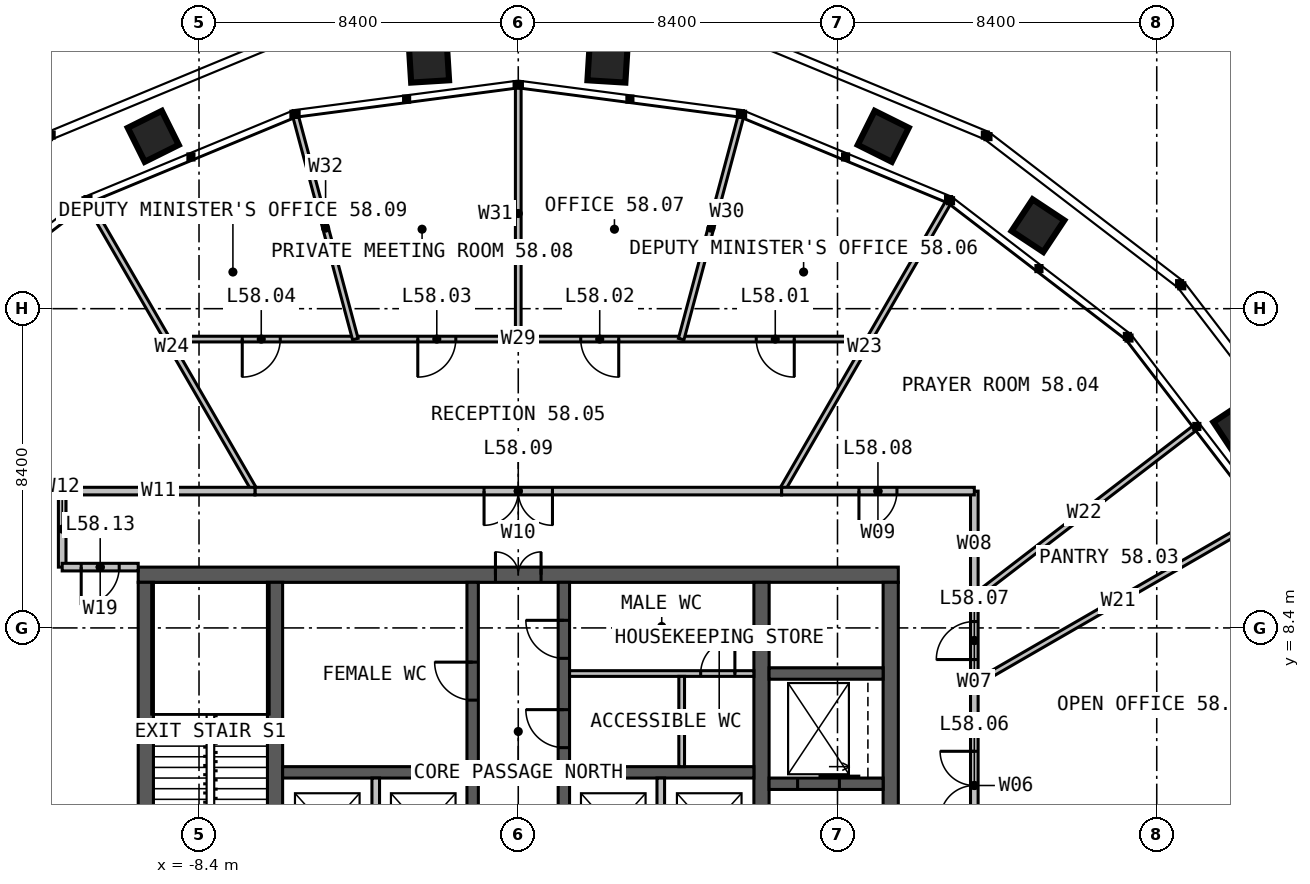
"""IFC4 building model, lengths in metres.
Left out: names, types, materials, properties, quantities, classifications, styles, units other than length and angle.
Written with IfcOpenShell. Run it as: python <this file> out.ifc"""

import sys

from ifc_helpers import new_model, si_unit, direction, frame, frame_2d, origin, place, context, subcontext, project, spatial, rectangle, extrude, element, fill, save


model = new_model("IFC4")
c1 = context("Model", 3, precision=1e-05, world=origin(), true_north=direction((0.0, 1.0)))
c2 = subcontext(c1, "Body", "Model", "MODEL_VIEW")
j1 = project(units=[si_unit("LENGTHUNIT", "METRE"), si_unit("PLANEANGLEUNIT", "RADIAN")], contexts=[c1])
p1 = place(None, origin())
s1 = spatial("IfcSite", under=j1, at=p1, CompositionType="ELEMENT")
p2 = place(p1, origin())
s2 = spatial("IfcBuilding", under=s1, at=p2, CompositionType="ELEMENT")
p3 = place(p2, frame((0.0, 0.0, 240.0)))
s3 = spatial("IfcBuildingStorey", under=s2, at=p3, CompositionType="ELEMENT", Elevation=240.0)
p4 = place(p3, frame((-10.0, 9.8, 0.0), z_axis=(0.0, 0.0, 1.0), x_axis=(1.0, 0.0, 0.0)))
e1 = element("IfcWall", 1, at=p4, inside=s3, PredefinedType="SOLIDWALL", context=c2, shape_type="SweptSolid", body=[
    extrude(rectangle(XDim=20.0, YDim=0.4, at=frame_2d((10.0, 0.0))), origin(), (0.0, 0.0, 1.0), 4.0),
])
p5 = place(p4, frame((9.4, 0.0, 0.0)))
e2 = element("IfcOpeningElement", 2, at=p5, cuts=e1, PredefinedType="OPENING", context=c2, shape_type="SweptSolid", body=[
    extrude(rectangle(XDim=1.2, YDim=2.2, at=frame_2d((0.6, 1.1))), frame((0.0, 0.21, 0.0), z_axis=(0.0, -1.0, 0.0), x_axis=(1.0, 0.0, 0.0)), (0.0, 0.0, 1.0), 0.42),
])
for number, where, z_axis, x_axis in (
    (3, (9.8, -9.6, 0.0), (0.0, 0.0, 1.0), (0.0, 1.0, 0.0)),
    (4, (-9.8, 9.6, 0.0), (0.0, 0.0, 1.0), (0.0, -1.0, 0.0)),
):
    element("IfcWall", number, at=place(p3, frame(where, z_axis=z_axis, x_axis=x_axis)), inside=s3, PredefinedType="SOLIDWALL", context=c2, shape_type="SweptSolid", body=[
        extrude(rectangle(XDim=19.2, YDim=0.4, at=frame_2d((9.6, 0.0))), origin(), (0.0, 0.0, 1.0), 4.0),
    ])
p6 = place(p3, frame((-6.4, -9.6, 0.0), z_axis=(0.0, 0.0, 1.0), x_axis=(0.0, 1.0, 0.0)))
e5 = element("IfcWall", 5, at=p6, inside=s3, PredefinedType="SOLIDWALL", context=c2, shape_type="SweptSolid", body=[
    extrude(rectangle(XDim=19.2, YDim=0.4, at=frame_2d((9.6, 0.0))), origin(), (0.0, 0.0, 1.0), 4.0),
])
p7 = place(p6, frame((9.1, 0.0, 0.0)))
e6 = element("IfcOpeningElement", 6, at=p7, cuts=e5, PredefinedType="OPENING", context=c2, shape_type="SweptSolid", body=[
    extrude(rectangle(XDim=1.0, YDim=2.2, at=frame_2d((0.5, 1.1))), frame((0.0, 0.21, 0.0), z_axis=(0.0, -1.0, 0.0), x_axis=(1.0, 0.0, 0.0)), (0.0, 0.0, 1.0), 0.42),
])
p8 = place(p3, frame((6.4, 9.6, 0.0), z_axis=(0.0, 0.0, 1.0), x_axis=(0.0, -1.0, 0.0)))
e7 = element("IfcWall", 7, at=p8, inside=s3, PredefinedType="SOLIDWALL", context=c2, shape_type="SweptSolid", body=[
    extrude(rectangle(XDim=19.2, YDim=0.4, at=frame_2d((9.6, 0.0))), origin(), (0.0, 0.0, 1.0), 4.0),
])
p9 = place(p8, frame((9.1, 0.0, 0.0)))
e8 = element("IfcOpeningElement", 8, at=p9, cuts=e7, PredefinedType="OPENING", context=c2, shape_type="SweptSolid", body=[
    extrude(rectangle(XDim=1.0, YDim=2.2, at=frame_2d((0.5, 1.1))), frame((0.0, 0.21, 0.0), z_axis=(0.0, -1.0, 0.0), x_axis=(1.0, 0.0, 0.0)), (0.0, 0.0, 1.0), 0.42),
])
for number, where, z_axis, x_axis in (
    (9, (-6.2, 4.6, 0.0), (0.0, 0.0, 1.0), (1.0, 0.0, 0.0)),
    (10, (1.35, 4.6, 0.0), (0.0, 0.0, 1.0), (1.0, 0.0, 0.0)),
):
    element("IfcWall", number, at=place(p3, frame(where, z_axis=z_axis, x_axis=x_axis)), inside=s3, PredefinedType="SOLIDWALL", context=c2, shape_type="SweptSolid", body=[
        extrude(rectangle(XDim=4.85, YDim=0.3, at=frame_2d((2.425, 0.0))), origin(), (0.0, 0.0, 1.0), 4.0),
    ])
p10 = place(p3, frame((-1.2, 1.45, 0.0), z_axis=(0.0, 0.0, 1.0), x_axis=(0.0, 1.0, 0.0)))
e11 = element("IfcWall", 11, at=p10, inside=s3, PredefinedType="SOLIDWALL", context=c2, shape_type="SweptSolid", body=[
    extrude(rectangle(XDim=8.15, YDim=0.3, at=frame_2d((4.075, 0.0))), origin(), (0.0, 0.0, 1.0), 4.0),
])
p11 = place(p10, frame((5.05, 0.0, 0.0)))
e12 = element("IfcOpeningElement", 12, at=p11, cuts=e11, PredefinedType="OPENING", context=c2, shape_type="SweptSolid", body=[
    extrude(rectangle(XDim=1.0, YDim=2.2, at=frame_2d((0.5, 1.1))), frame((0.0, 0.16, 0.0), z_axis=(0.0, -1.0, 0.0), x_axis=(1.0, 0.0, 0.0)), (0.0, 0.0, 1.0), 0.32),
])
p12 = place(p3, frame((1.2, 1.45, 0.0), z_axis=(0.0, 0.0, 1.0), x_axis=(0.0, 1.0, 0.0)))
e13 = element("IfcWall", 13, at=p12, inside=s3, PredefinedType="SOLIDWALL", context=c2, shape_type="SweptSolid", body=[
    extrude(rectangle(XDim=8.15, YDim=0.3, at=frame_2d((4.075, 0.0))), origin(), (0.0, 0.0, 1.0), 4.0),
])
p13 = place(p12, frame((3.8, 0.0, 0.0)))
e14 = element("IfcOpeningElement", 14, at=p13, cuts=e13, PredefinedType="OPENING", context=c2, shape_type="SweptSolid", body=[
    extrude(rectangle(XDim=1.0, YDim=2.2, at=frame_2d((0.5, 1.1))), frame((0.0, 0.16, 0.0), z_axis=(0.0, -1.0, 0.0), x_axis=(1.0, 0.0, 0.0)), (0.0, 0.0, 1.0), 0.32),
])
p14 = place(p12, frame((6.15, 0.0, 0.0)))
e15 = element("IfcOpeningElement", 15, at=p14, cuts=e13, PredefinedType="OPENING", context=c2, shape_type="SweptSolid", body=[
    extrude(rectangle(XDim=1.0, YDim=2.2, at=frame_2d((0.5, 1.1))), frame((0.0, 0.16, 0.0), z_axis=(0.0, -1.0, 0.0), x_axis=(1.0, 0.0, 0.0)), (0.0, 0.0, 1.0), 0.32),
])
p15 = place(p3, frame((6.6, 4.3, 0.0), z_axis=(0.0, 0.0, 1.0), x_axis=(1.0, 0.0, 0.0)))
e16 = element("IfcWall", 16, at=p15, inside=s3, PredefinedType="SOLIDWALL", context=c2, shape_type="SweptSolid", body=[
    extrude(rectangle(XDim=3.0, YDim=0.3, at=frame_2d((1.5, 0.0))), origin(), (0.0, 0.0, 1.0), 4.0),
])
p16 = place(p15, frame((0.75, 0.0, 0.0)))
e17 = element("IfcOpeningElement", 17, at=p16, cuts=e16, PredefinedType="OPENING", context=c2, shape_type="SweptSolid", body=[
    extrude(rectangle(XDim=1.1, YDim=2.2, at=frame_2d((0.55, 1.1))), frame((0.0, 0.16, 0.0), z_axis=(0.0, -1.0, 0.0), x_axis=(1.0, 0.0, 0.0)), (0.0, 0.0, 1.0), 0.32),
])
p17 = place(p3, frame((6.6, 7.2, 0.0), z_axis=(0.0, 0.0, 1.0), x_axis=(1.0, 0.0, 0.0)))
e18 = element("IfcWall", 18, at=p17, inside=s3, PredefinedType="SOLIDWALL", context=c2, shape_type="SweptSolid", body=[
    extrude(rectangle(XDim=3.0, YDim=0.3, at=frame_2d((1.5, 0.0))), origin(), (0.0, 0.0, 1.0), 4.0),
])
for number, where, z_axis, x_axis in (
    (19, (-3.75, 1.75, 0.0), (0.0, 0.0, 1.0), (0.0, 1.0, 0.0)),
    (20, (3.75, 1.75, 0.0), (0.0, 0.0, 1.0), (0.0, 1.0, 0.0)),
):
    element("IfcWall", number, at=place(p3, frame(where, z_axis=z_axis, x_axis=x_axis)), inside=s3, PredefinedType="SOLIDWALL", context=c2, shape_type="SweptSolid", body=[
        extrude(rectangle(XDim=2.7, YDim=0.2, at=frame_2d((1.35, 0.0))), origin(), (0.0, 0.0, 1.0), 3.75),
    ])
p18 = place(p3, frame((1.35, 7.2, 0.0), z_axis=(0.0, 0.0, 1.0), x_axis=(1.0, 0.0, 0.0)))
e21 = element("IfcWall", 21, at=p18, inside=s3, PredefinedType="PARTITIONING", context=c2, shape_type="SweptSolid", body=[
    extrude(rectangle(XDim=4.85, YDim=0.15, at=frame_2d((2.425, 0.0))), origin(), (0.0, 0.0, 1.0), 3.75),
])
p19 = place(p18, frame((3.45, 0.0, 0.0)))
e22 = element("IfcOpeningElement", 22, at=p19, cuts=e21, PredefinedType="OPENING", context=c2, shape_type="SweptSolid", body=[
    extrude(rectangle(XDim=0.9, YDim=2.2, at=frame_2d((0.45, 1.1))), frame((0.0, 0.085, 0.0), z_axis=(0.0, -1.0, 0.0), x_axis=(1.0, 0.0, 0.0)), (0.0, 0.0, 1.0), 0.17),
])
p20 = place(p3, frame((4.3, 4.75, 0.0), z_axis=(0.0, 0.0, 1.0), x_axis=(0.0, 1.0, 0.0)))
e23 = element("IfcWall", 23, at=p20, inside=s3, PredefinedType="PARTITIONING", context=c2, shape_type="SweptSolid", body=[
    extrude(rectangle(XDim=2.375, YDim=0.15, at=frame_2d((1.188, 0.0))), origin(), (0.0, 0.0, 1.0), 3.75),
])
p21 = place(p3, frame((12.0, 6.928, 0.0), z_axis=(0.0, 0.0, 1.0), x_axis=(0.866020224182, 0.500008971228, 0.0)))
e24 = element("IfcWall", 24, at=p21, inside=s3, PredefinedType="PARTITIONING", context=c2, shape_type="SweptSolid", body=[
    extrude(rectangle(XDim=8.753, YDim=0.15, at=frame_2d((4.376, 0.0))), origin(), (0.0, 0.0, 1.0), 2.79),
])
p22 = place(p3, frame((12.0, 9.208, 0.0), z_axis=(0.0, 0.0, 1.0), x_axis=(0.793369131671, 0.608740848729, 0.0)))
e25 = element("IfcWall", 25, at=p22, inside=s3, PredefinedType="PARTITIONING", context=c2, shape_type="SweptSolid", body=[
    extrude(rectangle(XDim=7.29, YDim=0.15, at=frame_2d((3.645, 0.0))), origin(), (0.0, 0.0, 1.0), 2.79),
])
for number, where, z_axis, x_axis in (
    (26, (6.928, 12.0, 0.0), (0.0, 0.0, 1.0), (0.5, 0.866, 0.0)),
    (27, (-6.928, 12.0, 0.0), (0.0, 0.0, 1.0), (-0.5, 0.866, 0.0)),
):
    element("IfcWall", number, at=place(p3, frame(where, z_axis=z_axis, x_axis=x_axis)), inside=s3, PredefinedType="PARTITIONING", context=c2, shape_type="SweptSolid", body=[
        extrude(rectangle(XDim=8.753, YDim=0.15, at=frame_2d((4.376, 0.0))), origin(), (0.0, 0.0, 1.0), 2.79),
    ])
p23 = place(p3, frame((12.0, 1.58, 0.0), z_axis=(0.0, 0.0, 1.0), x_axis=(0.0, 1.0, 0.0)))
e28 = element("IfcWall", 28, at=p23, inside=s3, PredefinedType="PARTITIONING", context=c2, shape_type="SweptSolid", body=[
    extrude(rectangle(XDim=5.348, YDim=0.2, at=frame_2d((2.674, 0.0))), origin(), (0.0, 0.0, 1.0), 3.8),
])
p24 = place(p23, frame((1.774, 0.0, 0.0)))
e29 = element("IfcOpeningElement", 29, at=p24, cuts=e28, PredefinedType="OPENING", context=c2, shape_type="SweptSolid", body=[
    extrude(rectangle(XDim=1.8, YDim=2.2, at=frame_2d((0.9, 1.1))), frame((0.0, 0.11, 0.0), z_axis=(0.0, -1.0, 0.0), x_axis=(1.0, 0.0, 0.0)), (0.0, 0.0, 1.0), 0.22),
])
p25 = place(p3, frame((12.0, 6.928, 0.0), z_axis=(0.0, 0.0, 1.0), x_axis=(0.0, 1.0, 0.0)))
e30 = element("IfcWall", 30, at=p25, inside=s3, PredefinedType="PARTITIONING", context=c2, shape_type="SweptSolid", body=[
    extrude(rectangle(XDim=2.28, YDim=0.2, at=frame_2d((1.14, 0.0))), origin(), (0.0, 0.0, 1.0), 3.8),
])
p26 = place(p25, frame((0.64, 0.0, 0.0)))
e31 = element("IfcOpeningElement", 31, at=p26, cuts=e30, PredefinedType="OPENING", context=c2, shape_type="SweptSolid", body=[
    extrude(rectangle(XDim=1.0, YDim=2.2, at=frame_2d((0.5, 1.1))), frame((0.0, 0.11, 0.0), z_axis=(0.0, -1.0, 0.0), x_axis=(1.0, 0.0, 0.0)), (0.0, 0.0, 1.0), 0.22),
])
p27 = place(p3, frame((12.0, 9.208, 0.0), z_axis=(0.0, 0.0, 1.0), x_axis=(0.0, 1.0, 0.0)))
e32 = element("IfcWall", 32, at=p27, inside=s3, PredefinedType="PARTITIONING", context=c2, shape_type="SweptSolid", body=[
    extrude(rectangle(XDim=2.792, YDim=0.2, at=frame_2d((1.396, 0.0))), origin(), (0.0, 0.0, 1.0), 3.8),
])
p28 = place(p3, frame((12.0, 12.0, 0.0), z_axis=(0.0, 0.0, 1.0), x_axis=(-1.0, 0.0, 0.0)))
e33 = element("IfcWall", 33, at=p28, inside=s3, PredefinedType="PARTITIONING", context=c2, shape_type="SweptSolid", body=[
    extrude(rectangle(XDim=5.072, YDim=0.2, at=frame_2d((2.536, 0.0))), origin(), (0.0, 0.0, 1.0), 3.8),
])
p29 = place(p28, frame((2.036, 0.0, 0.0)))
e34 = element("IfcOpeningElement", 34, at=p29, cuts=e33, PredefinedType="OPENING", context=c2, shape_type="SweptSolid", body=[
    extrude(rectangle(XDim=1.0, YDim=2.2, at=frame_2d((0.5, 1.1))), frame((0.0, 0.11, 0.0), z_axis=(0.0, -1.0, 0.0), x_axis=(1.0, 0.0, 0.0)), (0.0, 0.0, 1.0), 0.22),
])
p30 = place(p3, frame((9.238, 16.0, 0.0), z_axis=(0.0, 0.0, 1.0), x_axis=(-1.0, 0.0, 0.0)))
e35 = element("IfcWall", 35, at=p30, inside=s3, PredefinedType="PARTITIONING", context=c2, shape_type="SweptSolid", body=[
    extrude(rectangle(XDim=18.475, YDim=0.15, at=frame_2d((9.238, 0.0))), origin(), (0.0, 0.0, 1.0), 2.79),
])
p31 = place(p30, frame((1.975, 0.0, 0.0)))
e36 = element("IfcOpeningElement", 36, at=p31, cuts=e35, PredefinedType="OPENING", context=c2, shape_type="SweptSolid", body=[
    extrude(rectangle(XDim=1.0, YDim=2.2, at=frame_2d((0.5, 1.1))), frame((0.0, 0.085, 0.0), z_axis=(0.0, -1.0, 0.0), x_axis=(1.0, 0.0, 0.0)), (0.0, 0.0, 1.0), 0.17),
])
p32 = place(p30, frame((6.594, 0.0, 0.0)))
e37 = element("IfcOpeningElement", 37, at=p32, cuts=e35, PredefinedType="OPENING", context=c2, shape_type="SweptSolid", body=[
    extrude(rectangle(XDim=1.0, YDim=2.2, at=frame_2d((0.5, 1.1))), frame((0.0, 0.085, 0.0), z_axis=(0.0, -1.0, 0.0), x_axis=(1.0, 0.0, 0.0)), (0.0, 0.0, 1.0), 0.17),
])
p33 = place(p30, frame((10.881, 0.0, 0.0)))
e38 = element("IfcOpeningElement", 38, at=p33, cuts=e35, PredefinedType="OPENING", context=c2, shape_type="SweptSolid", body=[
    extrude(rectangle(XDim=1.0, YDim=2.2, at=frame_2d((0.5, 1.1))), frame((0.0, 0.085, 0.0), z_axis=(0.0, -1.0, 0.0), x_axis=(1.0, 0.0, 0.0)), (0.0, 0.0, 1.0), 0.17),
])
p34 = place(p30, frame((15.5, 0.0, 0.0)))
e39 = element("IfcOpeningElement", 39, at=p34, cuts=e35, PredefinedType="OPENING", context=c2, shape_type="SweptSolid", body=[
    extrude(rectangle(XDim=1.0, YDim=2.2, at=frame_2d((0.5, 1.1))), frame((0.0, 0.085, 0.0), z_axis=(0.0, -1.0, 0.0), x_axis=(1.0, 0.0, 0.0)), (0.0, 0.0, 1.0), 0.17),
])
p35 = place(p3, frame((4.287, 16.0, 0.0), z_axis=(0.0, 0.0, 1.0), x_axis=(0.258846444451, 0.965918484239, 0.0)))
e40 = element("IfcWall", 40, at=p35, inside=s3, PredefinedType="PARTITIONING", context=c2, shape_type="SweptSolid", body=[
    extrude(rectangle(XDim=6.045, YDim=0.15, at=frame_2d((3.022, 0.0))), origin(), (0.0, 0.0, 1.0), 2.79),
])
p36 = place(p3, frame((0.0, 16.0, 0.0), z_axis=(0.0, 0.0, 1.0), x_axis=(0.0, 1.0, 0.0)))
e41 = element("IfcWall", 41, at=p36, inside=s3, PredefinedType="PARTITIONING", context=c2, shape_type="SweptSolid", body=[
    extrude(rectangle(XDim=6.609, YDim=0.15, at=frame_2d((3.305, 0.0))), origin(), (0.0, 0.0, 1.0), 2.79),
])
p37 = place(p3, frame((-4.287, 16.0, 0.0), z_axis=(0.0, 0.0, 1.0), x_axis=(-0.258846444451, 0.965918484239, 0.0)))
e42 = element("IfcWall", 42, at=p37, inside=s3, PredefinedType="PARTITIONING", context=c2, shape_type="SweptSolid", body=[
    extrude(rectangle(XDim=6.045, YDim=0.15, at=frame_2d((3.022, 0.0))), origin(), (0.0, 0.0, 1.0), 2.79),
])
p38 = place(p3, frame((6.928, 12.0, 0.0), z_axis=(0.0, 0.0, 1.0), x_axis=(-1.0, 0.0, 0.0)))
e43 = element("IfcWall", 43, at=p38, inside=s3, PredefinedType="PARTITIONING", context=c2, shape_type="SweptSolid", body=[
    extrude(rectangle(XDim=13.856, YDim=0.2, at=frame_2d((6.928, 0.0))), origin(), (0.0, 0.0, 1.0), 3.8),
])
p39 = place(p38, frame((6.028, 0.0, 0.0)))
e44 = element("IfcOpeningElement", 44, at=p39, cuts=e43, PredefinedType="OPENING", context=c2, shape_type="SweptSolid", body=[
    extrude(rectangle(XDim=1.8, YDim=2.2, at=frame_2d((0.9, 1.1))), frame((0.0, 0.11, 0.0), z_axis=(0.0, -1.0, 0.0), x_axis=(1.0, 0.0, 0.0)), (0.0, 0.0, 1.0), 0.22),
])
p40 = place(p3, frame((-6.928, 12.0, 0.0), z_axis=(0.0, 0.0, 1.0), x_axis=(-1.0, 0.0, 0.0)))
e45 = element("IfcWall", 45, at=p40, inside=s3, PredefinedType="PARTITIONING", context=c2, shape_type="SweptSolid", body=[
    extrude(rectangle(XDim=5.072, YDim=0.2, at=frame_2d((2.536, 0.0))), origin(), (0.0, 0.0, 1.0), 3.8),
])
p41 = place(p3, frame((-12.0, 12.0, 0.0), z_axis=(0.0, 0.0, 1.0), x_axis=(0.0, -1.0, 0.0)))
e46 = element("IfcWall", 46, at=p41, inside=s3, PredefinedType="PARTITIONING", context=c2, shape_type="SweptSolid", body=[
    extrude(rectangle(XDim=2.0, YDim=0.2, at=frame_2d((1.0, 0.0))), origin(), (0.0, 0.0, 1.0), 3.8),
])
p42 = place(p3, frame((-10.0, 10.0, 0.0), z_axis=(0.0, 0.0, 1.0), x_axis=(-1.0, 0.0, 0.0)))
e47 = element("IfcWall", 47, at=p42, inside=s3, PredefinedType="PARTITIONING", context=c2, shape_type="SweptSolid", body=[
    extrude(rectangle(XDim=2.0, YDim=0.2, at=frame_2d((1.0, 0.0))), origin(), (0.0, 0.0, 1.0), 3.8),
])
p43 = place(p42, frame((0.5, 0.0, 0.0)))
e48 = element("IfcOpeningElement", 48, at=p43, cuts=e47, PredefinedType="OPENING", context=c2, shape_type="SweptSolid", body=[
    extrude(rectangle(XDim=1.0, YDim=2.2, at=frame_2d((0.5, 1.1))), frame((0.0, 0.11, 0.0), z_axis=(0.0, -1.0, 0.0), x_axis=(1.0, 0.0, 0.0)), (0.0, 0.0, 1.0), 0.22),
])
p44 = place(p5, origin())
e49 = element("IfcDoor", 49, at=p44, inside=s3, OperationType="DOUBLE_DOOR_SINGLE_SWING", PredefinedType="DOOR", context=c2, shape_type="SweptSolid", body=[
    extrude(rectangle(XDim=1.2, YDim=2.2, at=frame_2d((0.6, 1.1))), frame((0.0, 0.025, 0.0), z_axis=(0.0, -1.0, 0.0), x_axis=(1.0, 0.0, 0.0)), (0.0, 0.0, 1.0), 0.05),
])
fill(e2, e49)
p45 = place(p11, origin())
e50 = element("IfcDoor", 50, at=p45, inside=s3, OperationType="SINGLE_SWING_RIGHT", PredefinedType="DOOR", context=c2, shape_type="SweptSolid", body=[
    extrude(rectangle(XDim=1.0, YDim=2.2, at=frame_2d((0.5, 1.1))), frame((0.0, 0.025, 0.0), z_axis=(0.0, -1.0, 0.0), x_axis=(1.0, 0.0, 0.0)), (0.0, 0.0, 1.0), 0.05),
])
fill(e12, e50)
p46 = place(p13, origin())
e51 = element("IfcDoor", 51, at=p46, inside=s3, OperationType="SINGLE_SWING_RIGHT", PredefinedType="DOOR", context=c2, shape_type="SweptSolid", body=[
    extrude(rectangle(XDim=1.0, YDim=2.2, at=frame_2d((0.5, 1.1))), frame((0.0, 0.025, 0.0), z_axis=(0.0, -1.0, 0.0), x_axis=(1.0, 0.0, 0.0)), (0.0, 0.0, 1.0), 0.05),
])
fill(e14, e51)
p47 = place(p14, origin())
e52 = element("IfcDoor", 52, at=p47, inside=s3, OperationType="SINGLE_SWING_RIGHT", PredefinedType="DOOR", context=c2, shape_type="SweptSolid", body=[
    extrude(rectangle(XDim=1.0, YDim=2.2, at=frame_2d((0.5, 1.1))), frame((0.0, 0.025, 0.0), z_axis=(0.0, -1.0, 0.0), x_axis=(1.0, 0.0, 0.0)), (0.0, 0.0, 1.0), 0.05),
])
fill(e15, e52)
p48 = place(p19, origin())
e53 = element("IfcDoor", 53, at=p48, inside=s3, OperationType="SINGLE_SWING_RIGHT", PredefinedType="DOOR", context=c2, shape_type="SweptSolid", body=[
    extrude(rectangle(XDim=0.9, YDim=2.2, at=frame_2d((0.45, 1.1))), frame((0.0, 0.025, 0.0), z_axis=(0.0, -1.0, 0.0), x_axis=(1.0, 0.0, 0.0)), (0.0, 0.0, 1.0), 0.05),
])
fill(e22, e53)
p49 = place(p16, origin())
e54 = element("IfcDoor", 54, at=p49, inside=s3, OperationType="SLIDING_TO_LEFT", PredefinedType="DOOR", context=c2, shape_type="SweptSolid", body=[
    extrude(rectangle(XDim=1.1, YDim=2.2, at=frame_2d((0.55, 1.1))), frame((0.0, 0.025, 0.0), z_axis=(0.0, -1.0, 0.0), x_axis=(1.0, 0.0, 0.0)), (0.0, 0.0, 1.0), 0.05),
])
fill(e17, e54)
p50 = place(p24, origin())
e55 = element("IfcDoor", 55, at=p50, inside=s3, OperationType="DOUBLE_DOOR_SINGLE_SWING", PredefinedType="DOOR", context=c2, shape_type="SweptSolid", body=[
    extrude(rectangle(XDim=1.8, YDim=2.2, at=frame_2d((0.9, 1.1))), frame((0.0, 0.025, 0.0), z_axis=(0.0, -1.0, 0.0), x_axis=(1.0, 0.0, 0.0)), (0.0, 0.0, 1.0), 0.05),
])
fill(e29, e55)
p51 = place(p26, origin())
e56 = element("IfcDoor", 56, at=p51, inside=s3, OperationType="SINGLE_SWING_LEFT", PredefinedType="DOOR", context=c2, shape_type="SweptSolid", body=[
    extrude(rectangle(XDim=1.0, YDim=2.2, at=frame_2d((0.5, 1.1))), frame((0.0, 0.025, 0.0), z_axis=(0.0, -1.0, 0.0), x_axis=(1.0, 0.0, 0.0)), (0.0, 0.0, 1.0), 0.05),
])
fill(e31, e56)
p52 = place(p29, origin())
e57 = element("IfcDoor", 57, at=p52, inside=s3, OperationType="SINGLE_SWING_RIGHT", PredefinedType="DOOR", context=c2, shape_type="SweptSolid", body=[
    extrude(rectangle(XDim=1.0, YDim=2.2, at=frame_2d((0.5, 1.1))), frame((0.0, 0.025, 0.0), z_axis=(0.0, -1.0, 0.0), x_axis=(1.0, 0.0, 0.0)), (0.0, 0.0, 1.0), 0.05),
])
fill(e34, e57)
p53 = place(p31, origin())
e58 = element("IfcDoor", 58, at=p53, inside=s3, OperationType="SINGLE_SWING_LEFT", PredefinedType="DOOR", context=c2, shape_type="SweptSolid", body=[
    extrude(rectangle(XDim=1.0, YDim=2.2, at=frame_2d((0.5, 1.1))), frame((0.0, 0.025, 0.0), z_axis=(0.0, -1.0, 0.0), x_axis=(1.0, 0.0, 0.0)), (0.0, 0.0, 1.0), 0.05),
])
fill(e36, e58)
p54 = place(p32, origin())
e59 = element("IfcDoor", 59, at=p54, inside=s3, OperationType="SINGLE_SWING_LEFT", PredefinedType="DOOR", context=c2, shape_type="SweptSolid", body=[
    extrude(rectangle(XDim=1.0, YDim=2.2, at=frame_2d((0.5, 1.1))), frame((0.0, 0.025, 0.0), z_axis=(0.0, -1.0, 0.0), x_axis=(1.0, 0.0, 0.0)), (0.0, 0.0, 1.0), 0.05),
])
fill(e37, e59)
p55 = place(p33, origin())
e60 = element("IfcDoor", 60, at=p55, inside=s3, OperationType="SINGLE_SWING_RIGHT", PredefinedType="DOOR", context=c2, shape_type="SweptSolid", body=[
    extrude(rectangle(XDim=1.0, YDim=2.2, at=frame_2d((0.5, 1.1))), frame((0.0, 0.025, 0.0), z_axis=(0.0, -1.0, 0.0), x_axis=(1.0, 0.0, 0.0)), (0.0, 0.0, 1.0), 0.05),
])
fill(e38, e60)
p56 = place(p34, origin())
e61 = element("IfcDoor", 61, at=p56, inside=s3, OperationType="SINGLE_SWING_RIGHT", PredefinedType="DOOR", context=c2, shape_type="SweptSolid", body=[
    extrude(rectangle(XDim=1.0, YDim=2.2, at=frame_2d((0.5, 1.1))), frame((0.0, 0.025, 0.0), z_axis=(0.0, -1.0, 0.0), x_axis=(1.0, 0.0, 0.0)), (0.0, 0.0, 1.0), 0.05),
])
fill(e39, e61)
p57 = place(p39, origin())
e62 = element("IfcDoor", 62, at=p57, inside=s3, OperationType="DOUBLE_DOOR_SINGLE_SWING", PredefinedType="DOOR", context=c2, shape_type="SweptSolid", body=[
    extrude(rectangle(XDim=1.8, YDim=2.2, at=frame_2d((0.9, 1.1))), frame((0.0, 0.025, 0.0), z_axis=(0.0, -1.0, 0.0), x_axis=(1.0, 0.0, 0.0)), (0.0, 0.0, 1.0), 0.05),
])
fill(e44, e62)
p58 = place(p43, origin())
e63 = element("IfcDoor", 63, at=p58, inside=s3, OperationType="SINGLE_SWING_RIGHT", PredefinedType="DOOR", context=c2, shape_type="SweptSolid", body=[
    extrude(rectangle(XDim=1.0, YDim=2.2, at=frame_2d((0.5, 1.1))), frame((0.0, 0.025, 0.0), z_axis=(0.0, -1.0, 0.0), x_axis=(1.0, 0.0, 0.0)), (0.0, 0.0, 1.0), 0.05),
])
fill(e48, e63)
save(model, sys.argv[1])
